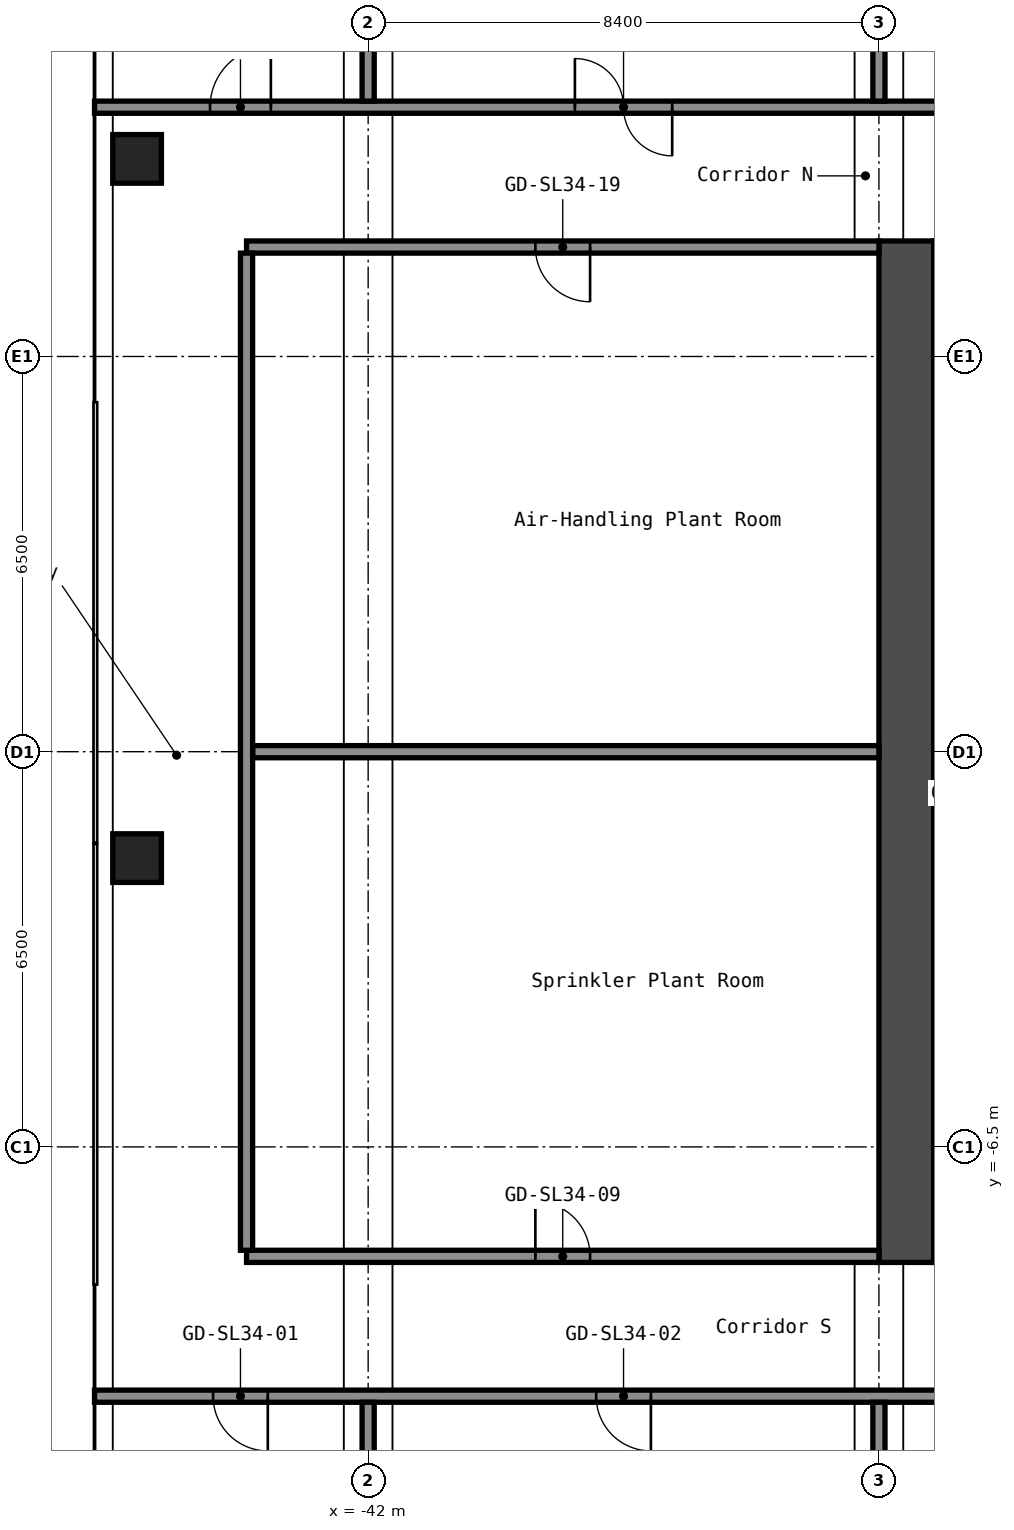
"""IFC4 building model, lengths in metres.
Left out: names, types, materials, properties, quantities, classifications, styles, units other than length and angle.
Written with IfcOpenShell. Run it as: python <this file> out.ifc"""

import sys

from ifc_helpers import new_model, si_unit, direction, frame, frame_2d, origin, origin_2d, place, context, subcontext, project, spatial, rectangle, hollow_rectangle, extrude, element, fill, save


model = new_model("IFC4")
c1 = context("Model", 3, precision=1e-05, world=origin(), true_north=direction((0.0, 1.0)))
c2 = subcontext(c1, "Body", "Model", "MODEL_VIEW")
j1 = project(units=[si_unit("LENGTHUNIT", "METRE"), si_unit("PLANEANGLEUNIT", "RADIAN")], contexts=[c1])
p1 = place(None, origin())
s1 = spatial("IfcSite", under=j1, at=p1, CompositionType="ELEMENT")
p2 = place(p1, origin())
s2 = spatial("IfcBuilding", under=s1, at=p2, CompositionType="ELEMENT")
p3 = place(p2, frame((0.0, 0.0, 120.2)))
s3 = spatial("IfcBuildingStorey", under=s2, at=p3, CompositionType="ELEMENT", Elevation=120.2)
for number, where, z_axis, x_axis in (
    (1, (-45.8, -1.75, 0.0), (0.0, 0.0, 1.0), (1.0, 0.0, 0.0)),
    (2, (-45.8, 9.75, 0.0), (0.0, 0.0, 1.0), (1.0, 0.0, 0.0)),
):
    element("IfcColumn", number, at=place(p3, frame(where, z_axis=z_axis, x_axis=x_axis)), inside=s3, PredefinedType="COLUMN", context=c2, shape_type="SweptSolid", body=[
        extrude(hollow_rectangle(XDim=0.8, YDim=0.8, WallThickness=0.032, at=origin_2d()), origin(), (0.0, 0.0, 1.0), 4.1),
    ])
p4 = place(p3, frame((-33.15, -8.4, 0.0), z_axis=(0.0, 0.0, 1.0), x_axis=(0.0, 1.0, 0.0)))
e3 = element("IfcWall", 3, at=p4, inside=s3, PredefinedType="SHEAR", context=c2, shape_type="SweptSolid", body=[
    extrude(rectangle(XDim=16.8, YDim=0.9, at=frame_2d((8.4, 0.0))), origin(), (0.0, 0.0, 1.0), 4.1),
])
p5 = place(p3, frame((-46.5, -10.6, 0.0), z_axis=(0.0, 0.0, 1.0), x_axis=(1.0, 0.0, 0.0)))
e4 = element("IfcWall", 4, at=p5, inside=s3, PredefinedType="PARTITIONING", context=c2, shape_type="SweptSolid", body=[
    extrude(rectangle(XDim=29.7, YDim=0.2, at=frame_2d((14.85, 0.0))), origin(), (0.0, 0.0, 1.0), 4.1),
])
p6 = place(p5, frame((1.95, 0.0, 0.0)))
e5 = element("IfcOpeningElement", 5, at=p6, cuts=e4, PredefinedType="OPENING", context=c2, shape_type="SweptSolid", body=[
    extrude(rectangle(XDim=0.9, YDim=2.1, at=frame_2d((0.45, 1.05))), frame((0.0, 0.11, 0.0), z_axis=(0.0, -1.0, 0.0), x_axis=(1.0, 0.0, 0.0)), (0.0, 0.0, 1.0), 0.22),
])
p7 = place(p5, frame((8.25, 0.0, 0.0)))
e6 = element("IfcOpeningElement", 6, at=p7, cuts=e4, PredefinedType="OPENING", context=c2, shape_type="SweptSolid", body=[
    extrude(rectangle(XDim=0.9, YDim=2.1, at=frame_2d((0.45, 1.05))), frame((0.0, 0.11, 0.0), z_axis=(0.0, -1.0, 0.0), x_axis=(1.0, 0.0, 0.0)), (0.0, 0.0, 1.0), 0.22),
])
p8 = place(p5, frame((16.65, 0.0, 0.0)))
e7 = element("IfcOpeningElement", 7, at=p8, cuts=e4, PredefinedType="OPENING", context=c2, shape_type="SweptSolid", body=[
    extrude(rectangle(XDim=0.9, YDim=2.1, at=frame_2d((0.45, 1.05))), frame((0.0, 0.11, 0.0), z_axis=(0.0, -1.0, 0.0), x_axis=(1.0, 0.0, 0.0)), (0.0, 0.0, 1.0), 0.22),
])
p9 = place(p5, frame((25.05, 0.0, 0.0)))
e8 = element("IfcOpeningElement", 8, at=p9, cuts=e4, PredefinedType="OPENING", context=c2, shape_type="SweptSolid", body=[
    extrude(rectangle(XDim=0.9, YDim=2.1, at=frame_2d((0.45, 1.05))), frame((0.0, 0.11, 0.0), z_axis=(0.0, -1.0, 0.0), x_axis=(1.0, 0.0, 0.0)), (0.0, 0.0, 1.0), 0.22),
])
p10 = place(p3, frame((-44.0, -8.3, 0.0), z_axis=(0.0, 0.0, 1.0), x_axis=(1.0, 0.0, 0.0)))
e9 = element("IfcWall", 9, at=p10, inside=s3, PredefinedType="PARTITIONING", context=c2, shape_type="SweptSolid", body=[
    extrude(rectangle(XDim=10.4, YDim=0.2, at=frame_2d((5.2, 0.0))), origin(), (0.0, 0.0, 1.0), 4.1),
])
p11 = place(p10, frame((4.75, 0.0, 0.0)))
e10 = element("IfcOpeningElement", 10, at=p11, cuts=e9, PredefinedType="OPENING", context=c2, shape_type="SweptSolid", body=[
    extrude(rectangle(XDim=0.9, YDim=2.1, at=frame_2d((0.45, 1.05))), frame((0.0, 0.11, 0.0), z_axis=(0.0, -1.0, 0.0), x_axis=(1.0, 0.0, 0.0)), (0.0, 0.0, 1.0), 0.22),
])
p12 = place(p3, frame((-43.9, 0.0, 0.0), z_axis=(0.0, 0.0, 1.0), x_axis=(1.0, 0.0, 0.0)))
e11 = element("IfcWall", 11, at=p12, inside=s3, PredefinedType="PARTITIONING", context=c2, shape_type="SweptSolid", body=[
    extrude(rectangle(XDim=10.3, YDim=0.2, at=frame_2d((5.15, 0.0))), origin(), (0.0, 0.0, 1.0), 4.1),
])
p13 = place(p3, frame((-44.0, 8.3, 0.0), z_axis=(0.0, 0.0, 1.0), x_axis=(1.0, 0.0, 0.0)))
e12 = element("IfcWall", 12, at=p13, inside=s3, PredefinedType="PARTITIONING", context=c2, shape_type="SweptSolid", body=[
    extrude(rectangle(XDim=10.4, YDim=0.2, at=frame_2d((5.2, 0.0))), origin(), (0.0, 0.0, 1.0), 4.1),
])
p14 = place(p13, frame((4.75, 0.0, 0.0)))
e13 = element("IfcOpeningElement", 13, at=p14, cuts=e12, PredefinedType="OPENING", context=c2, shape_type="SweptSolid", body=[
    extrude(rectangle(XDim=0.9, YDim=2.1, at=frame_2d((0.45, 1.05))), frame((0.0, 0.11, 0.0), z_axis=(0.0, -1.0, 0.0), x_axis=(1.0, 0.0, 0.0)), (0.0, 0.0, 1.0), 0.22),
])
p15 = place(p3, frame((-46.5, 10.6, 0.0), z_axis=(0.0, 0.0, 1.0), x_axis=(1.0, 0.0, 0.0)))
e14 = element("IfcWall", 14, at=p15, inside=s3, PredefinedType="PARTITIONING", context=c2, shape_type="SweptSolid", body=[
    extrude(rectangle(XDim=29.7, YDim=0.2, at=frame_2d((14.85, 0.0))), origin(), (0.0, 0.0, 1.0), 4.1),
])
p16 = place(p15, frame((1.9, 0.0, 0.0)))
e15 = element("IfcOpeningElement", 15, at=p16, cuts=e14, PredefinedType="OPENING", context=c2, shape_type="SweptSolid", body=[
    extrude(rectangle(XDim=1.0, YDim=2.1, at=frame_2d((0.5, 1.05))), frame((0.0, 0.11, 0.0), z_axis=(0.0, -1.0, 0.0), x_axis=(1.0, 0.0, 0.0)), (0.0, 0.0, 1.0), 0.22),
])
p17 = place(p15, frame((7.9, 0.0, 0.0)))
e16 = element("IfcOpeningElement", 16, at=p17, cuts=e14, PredefinedType="OPENING", context=c2, shape_type="SweptSolid", body=[
    extrude(rectangle(XDim=1.6, YDim=2.1, at=frame_2d((0.8, 1.05))), frame((0.0, 0.11, 0.0), z_axis=(0.0, -1.0, 0.0), x_axis=(1.0, 0.0, 0.0)), (0.0, 0.0, 1.0), 0.22),
])
p18 = place(p15, frame((16.65, 0.0, 0.0)))
e17 = element("IfcOpeningElement", 17, at=p18, cuts=e14, PredefinedType="OPENING", context=c2, shape_type="SweptSolid", body=[
    extrude(rectangle(XDim=0.9, YDim=2.1, at=frame_2d((0.45, 1.05))), frame((0.0, 0.11, 0.0), z_axis=(0.0, -1.0, 0.0), x_axis=(1.0, 0.0, 0.0)), (0.0, 0.0, 1.0), 0.22),
])
p19 = place(p15, frame((25.05, 0.0, 0.0)))
e18 = element("IfcOpeningElement", 18, at=p19, cuts=e14, PredefinedType="OPENING", context=c2, shape_type="SweptSolid", body=[
    extrude(rectangle(XDim=0.9, YDim=2.1, at=frame_2d((0.45, 1.05))), frame((0.0, 0.11, 0.0), z_axis=(0.0, -1.0, 0.0), x_axis=(1.0, 0.0, 0.0)), (0.0, 0.0, 1.0), 0.22),
])
p20 = place(p3, frame((-44.0, -8.2, 0.0), z_axis=(0.0, 0.0, 1.0), x_axis=(0.0, 1.0, 0.0)))
e19 = element("IfcWall", 19, at=p20, inside=s3, PredefinedType="PARTITIONING", context=c2, shape_type="SweptSolid", body=[
    extrude(rectangle(XDim=16.4, YDim=0.2, at=frame_2d((8.2, 0.0))), origin(), (0.0, 0.0, 1.0), 4.1),
])
p21 = place(p3, frame((-42.0, -19.3, 0.0), z_axis=(0.0, 0.0, 1.0), x_axis=(0.0, 1.0, 0.0)))
e20 = element("IfcWall", 20, at=p21, inside=s3, PredefinedType="PARTITIONING", context=c2, shape_type="SweptSolid", body=[
    extrude(rectangle(XDim=8.6, YDim=0.2, at=frame_2d((4.3, 0.0))), origin(), (0.0, 0.0, 1.0), 4.1),
])
p22 = place(p3, frame((-42.0, 10.7, 0.0), z_axis=(0.0, 0.0, 1.0), x_axis=(0.0, 1.0, 0.0)))
e21 = element("IfcWall", 21, at=p22, inside=s3, PredefinedType="PARTITIONING", context=c2, shape_type="SweptSolid", body=[
    extrude(rectangle(XDim=12.85, YDim=0.2, at=frame_2d((6.425, 0.0))), origin(), (0.0, 0.0, 1.0), 4.1),
])
p23 = place(p3, frame((-33.6, -19.3, 0.0), z_axis=(0.0, 0.0, 1.0), x_axis=(0.0, 1.0, 0.0)))
e22 = element("IfcWall", 22, at=p23, inside=s3, PredefinedType="PARTITIONING", context=c2, shape_type="SweptSolid", body=[
    extrude(rectangle(XDim=8.6, YDim=0.2, at=frame_2d((4.3, 0.0))), origin(), (0.0, 0.0, 1.0), 4.1),
])
p24 = place(p3, frame((-33.6, 10.7, 0.0), z_axis=(0.0, 0.0, 1.0), x_axis=(0.0, 1.0, 0.0)))
e23 = element("IfcWall", 23, at=p24, inside=s3, PredefinedType="PARTITIONING", context=c2, shape_type="SweptSolid", body=[
    extrude(rectangle(XDim=12.85, YDim=0.2, at=frame_2d((6.425, 0.0))), origin(), (0.0, 0.0, 1.0), 4.1),
])
p25 = place(p6, origin())
e24 = element("IfcDoor", 24, at=p25, inside=s3, OperationType="SINGLE_SWING_RIGHT", PredefinedType="DOOR", context=c2, shape_type="SweptSolid", body=[
    extrude(rectangle(XDim=0.9, YDim=2.1, at=frame_2d((0.45, 1.05))), frame((0.0, 0.025, 0.0), z_axis=(0.0, -1.0, 0.0), x_axis=(1.0, 0.0, 0.0)), (0.0, 0.0, 1.0), 0.05),
])
fill(e5, e24)
p26 = place(p7, origin())
e25 = element("IfcDoor", 25, at=p26, inside=s3, OperationType="SINGLE_SWING_RIGHT", PredefinedType="DOOR", context=c2, shape_type="SweptSolid", body=[
    extrude(rectangle(XDim=0.9, YDim=2.1, at=frame_2d((0.45, 1.05))), frame((0.0, 0.025, 0.0), z_axis=(0.0, -1.0, 0.0), x_axis=(1.0, 0.0, 0.0)), (0.0, 0.0, 1.0), 0.05),
])
fill(e6, e25)
p27 = place(p11, origin())
e26 = element("IfcDoor", 26, at=p27, inside=s3, OperationType="SINGLE_SWING_RIGHT", PredefinedType="DOOR", context=c2, shape_type="SweptSolid", body=[
    extrude(rectangle(XDim=0.9, YDim=2.1, at=frame_2d((0.45, 1.05))), frame((0.0, 0.025, 0.0), z_axis=(0.0, -1.0, 0.0), x_axis=(1.0, 0.0, 0.0)), (0.0, 0.0, 1.0), 0.05),
])
fill(e10, e26)
p28 = place(p14, origin())
e27 = element("IfcDoor", 27, at=p28, inside=s3, OperationType="SINGLE_SWING_RIGHT", PredefinedType="DOOR", context=c2, shape_type="SweptSolid", body=[
    extrude(rectangle(XDim=0.9, YDim=2.1, at=frame_2d((0.45, 1.05))), frame((0.0, 0.025, 0.0), z_axis=(0.0, -1.0, 0.0), x_axis=(1.0, 0.0, 0.0)), (0.0, 0.0, 1.0), 0.05),
])
fill(e13, e27)
p29 = place(p16, origin())
e28 = element("IfcDoor", 28, at=p29, inside=s3, OperationType="SINGLE_SWING_LEFT", PredefinedType="DOOR", context=c2, shape_type="SweptSolid", body=[
    extrude(rectangle(XDim=1.0, YDim=2.1, at=frame_2d((0.5, 1.05))), frame((0.0, 0.025, 0.0), z_axis=(0.0, -1.0, 0.0), x_axis=(1.0, 0.0, 0.0)), (0.0, 0.0, 1.0), 0.05),
])
fill(e15, e28)
p30 = place(p17, origin())
e29 = element("IfcDoor", 29, at=p30, inside=s3, OperationType="DOUBLE_DOOR_SINGLE_SWING", PredefinedType="DOOR", context=c2, shape_type="SweptSolid", body=[
    extrude(rectangle(XDim=1.6, YDim=2.1, at=frame_2d((0.8, 1.05))), frame((0.0, 0.025, 0.0), z_axis=(0.0, -1.0, 0.0), x_axis=(1.0, 0.0, 0.0)), (0.0, 0.0, 1.0), 0.05),
])
fill(e16, e29)
save(model, sys.argv[1])
